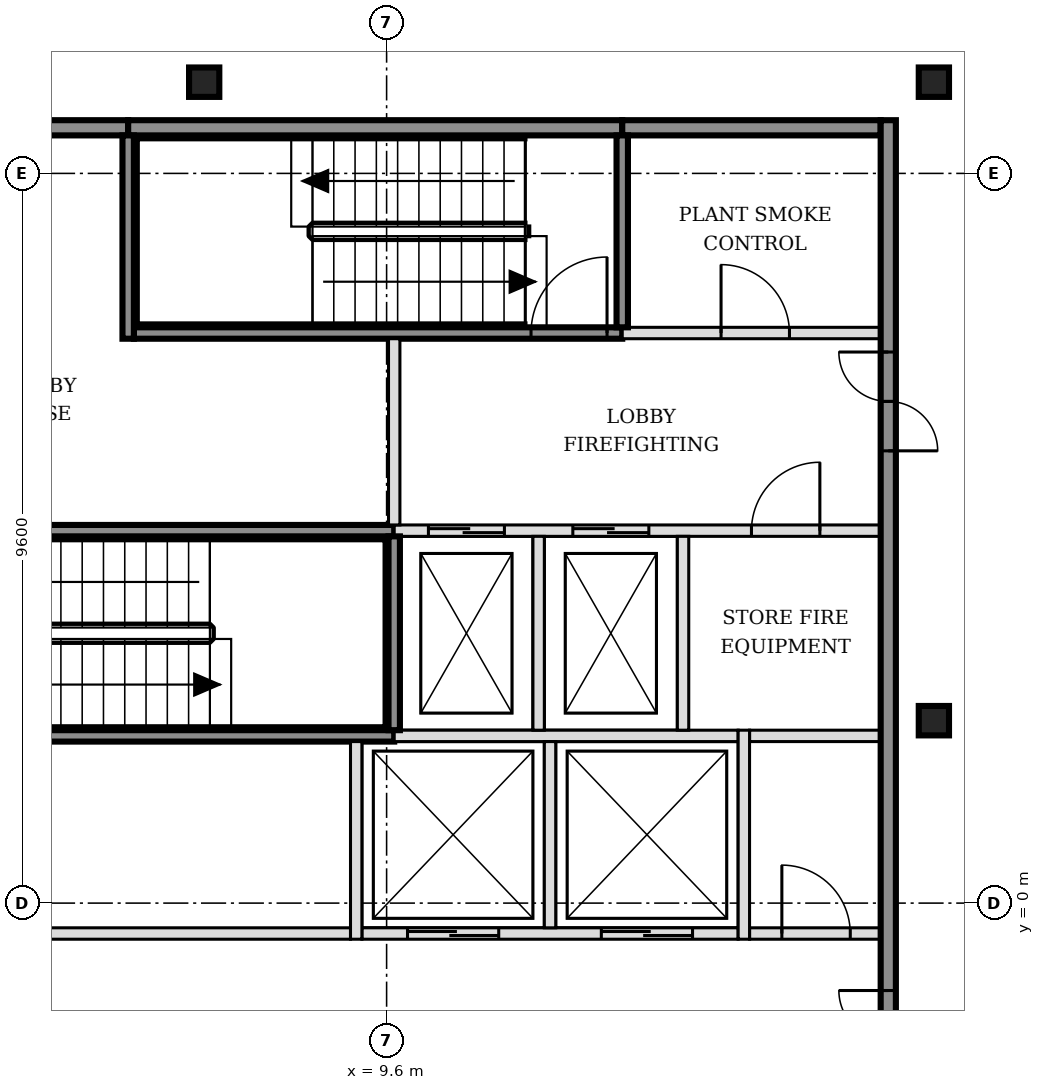
"""IFC4 building model, lengths in metres.
Left out: names, types, materials, properties, quantities, classifications, styles, units other than length and angle.
Written with IfcOpenShell. Run it as: python <this file> out.ifc"""

import sys

from ifc_helpers import new_model, si_unit, direction, frame, frame_2d, origin, origin_2d, place, context, subcontext, project, spatial, rectangle, i_section, extrude, element, fill, save


model = new_model("IFC4")
c1 = context("Model", 3, precision=1e-05, world=origin(), true_north=direction((0.0, 1.0)))
c2 = subcontext(c1, "Body", "Model", "MODEL_VIEW")
j1 = project(units=[si_unit("LENGTHUNIT", "METRE"), si_unit("PLANEANGLEUNIT", "RADIAN")], contexts=[c1])
p1 = place(None, origin())
s1 = spatial("IfcSite", under=j1, at=p1, CompositionType="ELEMENT")
p2 = place(p1, origin())
s2 = spatial("IfcBuilding", under=s1, at=p2, CompositionType="ELEMENT")
p3 = place(p2, frame((0.0, 0.0, 292.2)))
s3 = spatial("IfcBuildingStorey", under=s2, at=p3, CompositionType="ELEMENT", Elevation=292.2)
for number, where, z_axis, x_axis in (
    (1, (16.8, 2.4, -0.15), (0.0, 0.0, 1.0), (1.0, 0.0, 0.0)),
    (2, (7.2, 10.8, -0.15), (0.0, 0.0, 1.0), (1.0, 0.0, 0.0)),
    (3, (16.8, 10.8, -0.15), (0.0, 0.0, 1.0), (1.0, 0.0, 0.0)),
):
    element("IfcColumn", number, at=place(p3, frame(where, z_axis=z_axis, x_axis=x_axis)), inside=s3, PredefinedType="COLUMN", context=c2, shape_type="SweptSolid", body=[
        extrude(i_section(OverallWidth=0.398, OverallDepth=0.387, WebThickness=0.021, FlangeThickness=0.033, FilletRadius=0.015, at=origin_2d()), origin(), (0.0, 0.0, 1.0), 3.55),
    ])
p4 = place(p3, frame((-1.7, -0.4, 0.0), z_axis=(0.0, 0.0, 1.0), x_axis=(1.0, 0.0, 0.0)))
e4 = element("IfcWall", 4, at=p4, inside=s3, PredefinedType="PARTITIONING", context=c2, shape_type="SweptSolid", body=[
    extrude(rectangle(XDim=10.825, YDim=0.15, at=frame_2d((5.413, 0.0))), origin(), (0.0, 0.0, 1.0), 3.4),
])
p5 = place(p4, frame((4.95, 0.0, 0.0)))
e5 = element("IfcOpeningElement", 5, at=p5, cuts=e4, PredefinedType="OPENING", context=c2, shape_type="SweptSolid", body=[
    extrude(rectangle(XDim=0.9, YDim=2.1, at=frame_2d((0.45, 1.05))), frame((0.0, 0.085, 0.0), z_axis=(0.0, -1.0, 0.0), x_axis=(1.0, 0.0, 0.0)), (0.0, 0.0, 1.0), 0.17),
])
p6 = place(p3, frame((9.275, -0.4, 0.0), z_axis=(0.0, 0.0, 1.0), x_axis=(1.0, 0.0, 0.0)))
e6 = element("IfcWall", 6, at=p6, inside=s3, PredefinedType="SOLIDWALL", context=c2, shape_type="SweptSolid", body=[
    extrude(rectangle(XDim=4.95, YDim=0.15, at=frame_2d((2.475, 0.0))), origin(), (0.0, 0.0, 1.0), 3.4),
])
p7 = place(p6, frame((0.6, 0.0, 0.0)))
e7 = element("IfcOpeningElement", 7, at=p7, cuts=e6, PredefinedType="OPENING", context=c2, shape_type="SweptSolid", body=[
    extrude(rectangle(XDim=1.2, YDim=2.1, at=frame_2d((0.6, 1.05))), frame((0.0, 0.085, 0.0), z_axis=(0.0, -1.0, 0.0), x_axis=(1.0, 0.0, 0.0)), (0.0, 0.0, 1.0), 0.17),
])
p8 = place(p6, frame((3.15, 0.0, 0.0)))
e8 = element("IfcOpeningElement", 8, at=p8, cuts=e6, PredefinedType="OPENING", context=c2, shape_type="SweptSolid", body=[
    extrude(rectangle(XDim=1.2, YDim=2.1, at=frame_2d((0.6, 1.05))), frame((0.0, 0.085, 0.0), z_axis=(0.0, -1.0, 0.0), x_axis=(1.0, 0.0, 0.0)), (0.0, 0.0, 1.0), 0.17),
])
p9 = place(p3, frame((14.375, -0.4, 0.0), z_axis=(0.0, 0.0, 1.0), x_axis=(1.0, 0.0, 0.0)))
e9 = element("IfcWall", 9, at=p9, inside=s3, PredefinedType="PARTITIONING", context=c2, shape_type="SweptSolid", body=[
    extrude(rectangle(XDim=1.725, YDim=0.15, at=frame_2d((0.863, 0.0))), origin(), (0.0, 0.0, 1.0), 3.4),
])
p10 = place(p9, frame((0.425, 0.0, 0.0)))
e10 = element("IfcOpeningElement", 10, at=p10, cuts=e9, PredefinedType="OPENING", context=c2, shape_type="SweptSolid", body=[
    extrude(rectangle(XDim=0.9, YDim=2.1, at=frame_2d((0.45, 1.05))), frame((0.0, 0.085, 0.0), z_axis=(0.0, -1.0, 0.0), x_axis=(1.0, 0.0, 0.0)), (0.0, 0.0, 1.0), 0.17),
])
p11 = place(p3, frame((3.2, 2.2, 0.0), z_axis=(0.0, 0.0, 1.0), x_axis=(1.0, 0.0, 0.0)))
e11 = element("IfcWall", 11, at=p11, inside=s3, PredefinedType="SOLIDWALL", context=c2, shape_type="SweptSolid", body=[
    extrude(rectangle(XDim=6.5, YDim=0.15, at=frame_2d((3.25, 0.0))), origin(), (0.0, 0.0, 1.0), 3.4),
])
p12 = place(p3, frame((9.7, 2.2, 0.0), z_axis=(0.0, 0.0, 1.0), x_axis=(1.0, 0.0, 0.0)))
e12 = element("IfcWall", 12, at=p12, inside=s3, PredefinedType="SOLIDWALL", context=c2, shape_type="SweptSolid", body=[
    extrude(rectangle(XDim=4.525, YDim=0.15, at=frame_2d((2.263, 0.0))), origin(), (0.0, 0.0, 1.0), 3.4),
])
p13 = place(p3, frame((14.375, 2.2, 0.0), z_axis=(0.0, 0.0, 1.0), x_axis=(1.0, 0.0, 0.0)))
e13 = element("IfcWall", 13, at=p13, inside=s3, PredefinedType="PARTITIONING", context=c2, shape_type="SweptSolid", body=[
    extrude(rectangle(XDim=1.725, YDim=0.15, at=frame_2d((0.863, 0.0))), origin(), (0.0, 0.0, 1.0), 3.4),
])
p14 = place(p3, frame((3.2, 4.9, 0.0), z_axis=(0.0, 0.0, 1.0), x_axis=(1.0, 0.0, 0.0)))
e14 = element("IfcWall", 14, at=p14, inside=s3, PredefinedType="SOLIDWALL", context=c2, shape_type="SweptSolid", body=[
    extrude(rectangle(XDim=6.5, YDim=0.15, at=frame_2d((3.25, 0.0))), origin(), (0.0, 0.0, 1.0), 3.4),
])
p15 = place(p14, frame((0.175, 0.0, 0.0)))
e15 = element("IfcOpeningElement", 15, at=p15, cuts=e14, PredefinedType="OPENING", context=c2, shape_type="SweptSolid", body=[
    extrude(rectangle(XDim=1.0, YDim=2.1, at=frame_2d((0.5, 1.05))), frame((0.0, 0.085, 0.0), z_axis=(0.0, -1.0, 0.0), x_axis=(1.0, 0.0, 0.0)), (0.0, 0.0, 1.0), 0.17),
])
p16 = place(p3, frame((9.7, 4.9, 0.0), z_axis=(0.0, 0.0, 1.0), x_axis=(1.0, 0.0, 0.0)))
e16 = element("IfcWall", 16, at=p16, inside=s3, PredefinedType="SOLIDWALL", context=c2, shape_type="SweptSolid", body=[
    extrude(rectangle(XDim=6.4, YDim=0.15, at=frame_2d((3.2, 0.0))), origin(), (0.0, 0.0, 1.0), 3.4),
])
p17 = place(p16, frame((0.45, 0.0, 0.0)))
e17 = element("IfcOpeningElement", 17, at=p17, cuts=e16, PredefinedType="OPENING", context=c2, shape_type="SweptSolid", body=[
    extrude(rectangle(XDim=1.0, YDim=2.1, at=frame_2d((0.5, 1.05))), frame((0.0, 0.085, 0.0), z_axis=(0.0, -1.0, 0.0), x_axis=(1.0, 0.0, 0.0)), (0.0, 0.0, 1.0), 0.17),
])
p18 = place(p16, frame((2.35, 0.0, 0.0)))
e18 = element("IfcOpeningElement", 18, at=p18, cuts=e16, PredefinedType="OPENING", context=c2, shape_type="SweptSolid", body=[
    extrude(rectangle(XDim=1.0, YDim=2.1, at=frame_2d((0.5, 1.05))), frame((0.0, 0.085, 0.0), z_axis=(0.0, -1.0, 0.0), x_axis=(1.0, 0.0, 0.0)), (0.0, 0.0, 1.0), 0.17),
])
p19 = place(p16, frame((4.7, 0.0, 0.0)))
e19 = element("IfcOpeningElement", 19, at=p19, cuts=e16, PredefinedType="OPENING", context=c2, shape_type="SweptSolid", body=[
    extrude(rectangle(XDim=0.9, YDim=2.1, at=frame_2d((0.45, 1.05))), frame((0.0, 0.085, 0.0), z_axis=(0.0, -1.0, 0.0), x_axis=(1.0, 0.0, 0.0)), (0.0, 0.0, 1.0), 0.17),
])
p20 = place(p3, frame((6.275, 7.5, 0.0), z_axis=(0.0, 0.0, 1.0), x_axis=(1.0, 0.0, 0.0)))
e20 = element("IfcWall", 20, at=p20, inside=s3, PredefinedType="SOLIDWALL", context=c2, shape_type="SweptSolid", body=[
    extrude(rectangle(XDim=6.425, YDim=0.15, at=frame_2d((3.212, 0.0))), origin(), (0.0, 0.0, 1.0), 3.4),
])
p21 = place(p20, frame((5.225, 0.0, 0.0)))
e21 = element("IfcOpeningElement", 21, at=p21, cuts=e20, PredefinedType="OPENING", context=c2, shape_type="SweptSolid", body=[
    extrude(rectangle(XDim=1.0, YDim=2.1, at=frame_2d((0.5, 1.05))), frame((0.0, 0.085, 0.0), z_axis=(0.0, -1.0, 0.0), x_axis=(1.0, 0.0, 0.0)), (0.0, 0.0, 1.0), 0.17),
])
p22 = place(p3, frame((12.7, 7.5, 0.0), z_axis=(0.0, 0.0, 1.0), x_axis=(1.0, 0.0, 0.0)))
e22 = element("IfcWall", 22, at=p22, inside=s3, PredefinedType="SOLIDWALL", context=c2, shape_type="SweptSolid", body=[
    extrude(rectangle(XDim=3.4, YDim=0.15, at=frame_2d((1.7, 0.0))), origin(), (0.0, 0.0, 1.0), 3.4),
])
p23 = place(p22, frame((1.3, 0.0, 0.0)))
e23 = element("IfcOpeningElement", 23, at=p23, cuts=e22, PredefinedType="OPENING", context=c2, shape_type="SweptSolid", body=[
    extrude(rectangle(XDim=0.9, YDim=2.1, at=frame_2d((0.45, 1.05))), frame((0.0, 0.085, 0.0), z_axis=(0.0, -1.0, 0.0), x_axis=(1.0, 0.0, 0.0)), (0.0, 0.0, 1.0), 0.17),
])
p24 = place(p3, frame((-1.7, 10.2, 0.0), z_axis=(0.0, 0.0, 1.0), x_axis=(1.0, 0.0, 0.0)))
e24 = element("IfcWall", 24, at=p24, inside=s3, PredefinedType="SOLIDWALL", context=c2, shape_type="SweptSolid", body=[
    extrude(rectangle(XDim=7.9, YDim=0.2, at=frame_2d((3.95, 0.0))), origin(), (0.0, 0.0, 1.0), 3.4),
])
p25 = place(p3, frame((6.2, 10.2, 0.0), z_axis=(0.0, 0.0, 1.0), x_axis=(1.0, 0.0, 0.0)))
e25 = element("IfcWall", 25, at=p25, inside=s3, PredefinedType="SOLIDWALL", context=c2, shape_type="SweptSolid", body=[
    extrude(rectangle(XDim=6.5, YDim=0.2, at=frame_2d((3.25, 0.0))), origin(), (0.0, 0.0, 1.0), 3.4),
])
p26 = place(p3, frame((12.7, 10.2, 0.0), z_axis=(0.0, 0.0, 1.0), x_axis=(1.0, 0.0, 0.0)))
e26 = element("IfcWall", 26, at=p26, inside=s3, PredefinedType="SOLIDWALL", context=c2, shape_type="SweptSolid", body=[
    extrude(rectangle(XDim=3.4, YDim=0.2, at=frame_2d((1.7, 0.0))), origin(), (0.0, 0.0, 1.0), 3.4),
])
p27 = place(p3, frame((6.2, 7.425, 0.0), z_axis=(0.0, 0.0, 1.0), x_axis=(0.0, 1.0, 0.0)))
e27 = element("IfcWall", 27, at=p27, inside=s3, PredefinedType="SOLIDWALL", context=c2, shape_type="SweptSolid", body=[
    extrude(rectangle(XDim=2.675, YDim=0.15, at=frame_2d((1.337, 0.0))), origin(), (0.0, 0.0, 1.0), 3.4),
])
p28 = place(p3, frame((9.2, -0.475, 0.0), z_axis=(0.0, 0.0, 1.0), x_axis=(0.0, 1.0, 0.0)))
e28 = element("IfcWall", 28, at=p28, inside=s3, PredefinedType="SOLIDWALL", context=c2, shape_type="SweptSolid", body=[
    extrude(rectangle(XDim=2.6, YDim=0.15, at=frame_2d((1.3, 0.0))), origin(), (0.0, 0.0, 1.0), 3.4),
])
p29 = place(p3, frame((9.7, 2.275, 0.0), z_axis=(0.0, 0.0, 1.0), x_axis=(0.0, 1.0, 0.0)))
e29 = element("IfcWall", 29, at=p29, inside=s3, PredefinedType="SOLIDWALL", context=c2, shape_type="SweptSolid", body=[
    extrude(rectangle(XDim=2.55, YDim=0.15, at=frame_2d((1.275, 0.0))), origin(), (0.0, 0.0, 1.0), 3.4),
])
p30 = place(p3, frame((9.7, 4.975, 0.0), z_axis=(0.0, 0.0, 1.0), x_axis=(0.0, 1.0, 0.0)))
e30 = element("IfcWall", 30, at=p30, inside=s3, PredefinedType="SOLIDWALL", context=c2, shape_type="SweptSolid", body=[
    extrude(rectangle(XDim=2.45, YDim=0.15, at=frame_2d((1.225, 0.0))), origin(), (0.0, 0.0, 1.0), 3.4),
])
p31 = place(p3, frame((11.6, 2.275, 0.0), z_axis=(0.0, 0.0, 1.0), x_axis=(0.0, 1.0, 0.0)))
e31 = element("IfcWall", 31, at=p31, inside=s3, PredefinedType="SOLIDWALL", context=c2, shape_type="SweptSolid", body=[
    extrude(rectangle(XDim=2.55, YDim=0.15, at=frame_2d((1.275, 0.0))), origin(), (0.0, 0.0, 1.0), 3.4),
])
p32 = place(p3, frame((11.75, -0.325, 0.0), z_axis=(0.0, 0.0, 1.0), x_axis=(0.0, 1.0, 0.0)))
e32 = element("IfcWall", 32, at=p32, inside=s3, PredefinedType="SOLIDWALL", context=c2, shape_type="SweptSolid", body=[
    extrude(rectangle(XDim=2.45, YDim=0.15, at=frame_2d((1.225, 0.0))), origin(), (0.0, 0.0, 1.0), 3.4),
])
p33 = place(p3, frame((12.7, 7.575, 0.0), z_axis=(0.0, 0.0, 1.0), x_axis=(0.0, 1.0, 0.0)))
e33 = element("IfcWall", 33, at=p33, inside=s3, PredefinedType="SOLIDWALL", context=c2, shape_type="SweptSolid", body=[
    extrude(rectangle(XDim=2.525, YDim=0.15, at=frame_2d((1.263, 0.0))), origin(), (0.0, 0.0, 1.0), 3.4),
])
p34 = place(p3, frame((13.5, 2.275, 0.0), z_axis=(0.0, 0.0, 1.0), x_axis=(0.0, 1.0, 0.0)))
e34 = element("IfcWall", 34, at=p34, inside=s3, PredefinedType="SOLIDWALL", context=c2, shape_type="SweptSolid", body=[
    extrude(rectangle(XDim=2.55, YDim=0.15, at=frame_2d((1.275, 0.0))), origin(), (0.0, 0.0, 1.0), 3.4),
])
p35 = place(p3, frame((14.3, -0.475, 0.0), z_axis=(0.0, 0.0, 1.0), x_axis=(0.0, 1.0, 0.0)))
e35 = element("IfcWall", 35, at=p35, inside=s3, PredefinedType="SOLIDWALL", context=c2, shape_type="SweptSolid", body=[
    extrude(rectangle(XDim=2.75, YDim=0.15, at=frame_2d((1.375, 0.0))), origin(), (0.0, 0.0, 1.0), 3.4),
])
p36 = place(p3, frame((16.2, -5.5, 0.0), z_axis=(0.0, 0.0, 1.0), x_axis=(0.0, 1.0, 0.0)))
e36 = element("IfcWall", 36, at=p36, inside=s3, PredefinedType="SOLIDWALL", context=c2, shape_type="SweptSolid", body=[
    extrude(rectangle(XDim=15.8, YDim=0.2, at=frame_2d((7.9, 0.0))), origin(), (0.0, 0.0, 1.0), 3.4),
])
p37 = place(p36, frame((3.05, 0.0, 0.0)))
e37 = element("IfcOpeningElement", 37, at=p37, cuts=e36, PredefinedType="OPENING", context=c2, shape_type="SweptSolid", body=[
    extrude(rectangle(XDim=1.3, YDim=2.1, at=frame_2d((0.65, 1.05))), frame((0.0, 0.11, 0.0), z_axis=(0.0, -1.0, 0.0), x_axis=(1.0, 0.0, 0.0)), (0.0, 0.0, 1.0), 0.22),
])
p38 = place(p36, frame((11.45, 0.0, 0.0)))
e38 = element("IfcOpeningElement", 38, at=p38, cuts=e36, PredefinedType="OPENING", context=c2, shape_type="SweptSolid", body=[
    extrude(rectangle(XDim=1.3, YDim=2.1, at=frame_2d((0.65, 1.05))), frame((0.0, 0.11, 0.0), z_axis=(0.0, -1.0, 0.0), x_axis=(1.0, 0.0, 0.0)), (0.0, 0.0, 1.0), 0.22),
])
p39 = place(p3, frame((16.722, -14.272, 0.0), z_axis=(0.0, 0.0, 1.0), x_axis=(0.707106781187, 0.707106781187, 0.0)))
e39 = element("IfcWall", 39, at=p39, inside=s3, PredefinedType="PARTITIONING", context=c2, shape_type="SweptSolid", body=[
    extrude(rectangle(XDim=20.058, YDim=0.15, at=frame_2d((10.029, 0.0))), origin(), (0.0, 0.0, 1.0), 2.68),
])
p40 = place(p39, frame((3.195, 0.0, 0.0)))
e40 = element("IfcOpeningElement", 40, at=p40, cuts=e39, PredefinedType="OPENING", context=c2, shape_type="SweptSolid", body=[
    extrude(rectangle(XDim=0.9, YDim=2.1, at=frame_2d((0.45, 1.05))), frame((0.0, 0.085, 0.0), z_axis=(0.0, -1.0, 0.0), x_axis=(1.0, 0.0, 0.0)), (0.0, 0.0, 1.0), 0.17),
])
p41 = place(p39, frame((9.193, 0.0, 0.0)))
e41 = element("IfcOpeningElement", 41, at=p41, cuts=e39, PredefinedType="OPENING", context=c2, shape_type="SweptSolid", body=[
    extrude(rectangle(XDim=0.9, YDim=2.1, at=frame_2d((0.45, 1.05))), frame((0.0, 0.085, 0.0), z_axis=(0.0, -1.0, 0.0), x_axis=(1.0, 0.0, 0.0)), (0.0, 0.0, 1.0), 0.17),
])
p42 = place(p39, frame((17.613, 0.0, 0.0)))
e42 = element("IfcOpeningElement", 42, at=p42, cuts=e39, PredefinedType="OPENING", context=c2, shape_type="SweptSolid", body=[
    extrude(rectangle(XDim=0.9, YDim=2.1, at=frame_2d((0.45, 1.05))), frame((0.0, 0.085, 0.0), z_axis=(0.0, -1.0, 0.0), x_axis=(1.0, 0.0, 0.0)), (0.0, 0.0, 1.0), 0.17),
])
p43 = place(p7, origin())
e43 = element("IfcDoor", 43, at=p43, inside=s3, OperationType="DOUBLE_DOOR_SLIDING", PredefinedType="DOOR", context=c2, shape_type="SweptSolid", body=[
    extrude(rectangle(XDim=1.2, YDim=2.1, at=frame_2d((0.6, 1.05))), frame((0.0, 0.025, 0.0), z_axis=(0.0, -1.0, 0.0), x_axis=(1.0, 0.0, 0.0)), (0.0, 0.0, 1.0), 0.05),
])
fill(e7, e43)
p44 = place(p8, origin())
e44 = element("IfcDoor", 44, at=p44, inside=s3, OperationType="DOUBLE_DOOR_SLIDING", PredefinedType="DOOR", context=c2, shape_type="SweptSolid", body=[
    extrude(rectangle(XDim=1.2, YDim=2.1, at=frame_2d((0.6, 1.05))), frame((0.0, 0.025, 0.0), z_axis=(0.0, -1.0, 0.0), x_axis=(1.0, 0.0, 0.0)), (0.0, 0.0, 1.0), 0.05),
])
fill(e8, e44)
p45 = place(p17, origin())
e45 = element("IfcDoor", 45, at=p45, inside=s3, OperationType="DOUBLE_DOOR_SLIDING", PredefinedType="DOOR", context=c2, shape_type="SweptSolid", body=[
    extrude(rectangle(XDim=1.0, YDim=2.1, at=frame_2d((0.5, 1.05))), frame((0.0, 0.025, 0.0), z_axis=(0.0, -1.0, 0.0), x_axis=(1.0, 0.0, 0.0)), (0.0, 0.0, 1.0), 0.05),
])
fill(e17, e45)
p46 = place(p18, origin())
e46 = element("IfcDoor", 46, at=p46, inside=s3, OperationType="DOUBLE_DOOR_SLIDING", PredefinedType="DOOR", context=c2, shape_type="SweptSolid", body=[
    extrude(rectangle(XDim=1.0, YDim=2.1, at=frame_2d((0.5, 1.05))), frame((0.0, 0.025, 0.0), z_axis=(0.0, -1.0, 0.0), x_axis=(1.0, 0.0, 0.0)), (0.0, 0.0, 1.0), 0.05),
])
fill(e18, e46)
p47 = place(p21, origin())
e47 = element("IfcDoor", 47, at=p47, inside=s3, OperationType="SINGLE_SWING_RIGHT", PredefinedType="DOOR", context=c2, shape_type="SweptSolid", body=[
    extrude(rectangle(XDim=1.0, YDim=2.1, at=frame_2d((0.5, 1.05))), frame((0.0, 0.025, 0.0), z_axis=(0.0, -1.0, 0.0), x_axis=(1.0, 0.0, 0.0)), (0.0, 0.0, 1.0), 0.05),
])
fill(e21, e47)
p48 = place(p37, origin())
e48 = element("IfcDoor", 48, at=p48, inside=s3, OperationType="DOUBLE_DOOR_SINGLE_SWING", PredefinedType="DOOR", context=c2, shape_type="SweptSolid", body=[
    extrude(rectangle(XDim=1.3, YDim=2.1, at=frame_2d((0.65, 1.05))), frame((0.0, 0.025, 0.0), z_axis=(0.0, -1.0, 0.0), x_axis=(1.0, 0.0, 0.0)), (0.0, 0.0, 1.0), 0.05),
])
fill(e37, e48)
p49 = place(p38, origin())
e49 = element("IfcDoor", 49, at=p49, inside=s3, OperationType="DOUBLE_DOOR_SINGLE_SWING", PredefinedType="DOOR", context=c2, shape_type="SweptSolid", body=[
    extrude(rectangle(XDim=1.3, YDim=2.1, at=frame_2d((0.65, 1.05))), frame((0.0, 0.025, 0.0), z_axis=(0.0, -1.0, 0.0), x_axis=(1.0, 0.0, 0.0)), (0.0, 0.0, 1.0), 0.05),
])
fill(e38, e49)
p50 = place(p10, origin())
e50 = element("IfcDoor", 50, at=p50, inside=s3, OperationType="SINGLE_SWING_LEFT", PredefinedType="DOOR", context=c2, shape_type="SweptSolid", body=[
    extrude(rectangle(XDim=0.9, YDim=2.1, at=frame_2d((0.45, 1.05))), frame((0.0, 0.025, 0.0), z_axis=(0.0, -1.0, 0.0), x_axis=(1.0, 0.0, 0.0)), (0.0, 0.0, 1.0), 0.05),
])
fill(e10, e50)
p51 = place(p19, origin())
e51 = element("IfcDoor", 51, at=p51, inside=s3, OperationType="SINGLE_SWING_RIGHT", PredefinedType="DOOR", context=c2, shape_type="SweptSolid", body=[
    extrude(rectangle(XDim=0.9, YDim=2.1, at=frame_2d((0.45, 1.05))), frame((0.0, 0.025, 0.0), z_axis=(0.0, -1.0, 0.0), x_axis=(1.0, 0.0, 0.0)), (0.0, 0.0, 1.0), 0.05),
])
fill(e19, e51)
p52 = place(p23, origin())
e52 = element("IfcDoor", 52, at=p52, inside=s3, OperationType="SINGLE_SWING_LEFT", PredefinedType="DOOR", context=c2, shape_type="SweptSolid", body=[
    extrude(rectangle(XDim=0.9, YDim=2.1, at=frame_2d((0.45, 1.05))), frame((0.0, 0.025, 0.0), z_axis=(0.0, -1.0, 0.0), x_axis=(1.0, 0.0, 0.0)), (0.0, 0.0, 1.0), 0.05),
])
fill(e23, e52)
save(model, sys.argv[1])
